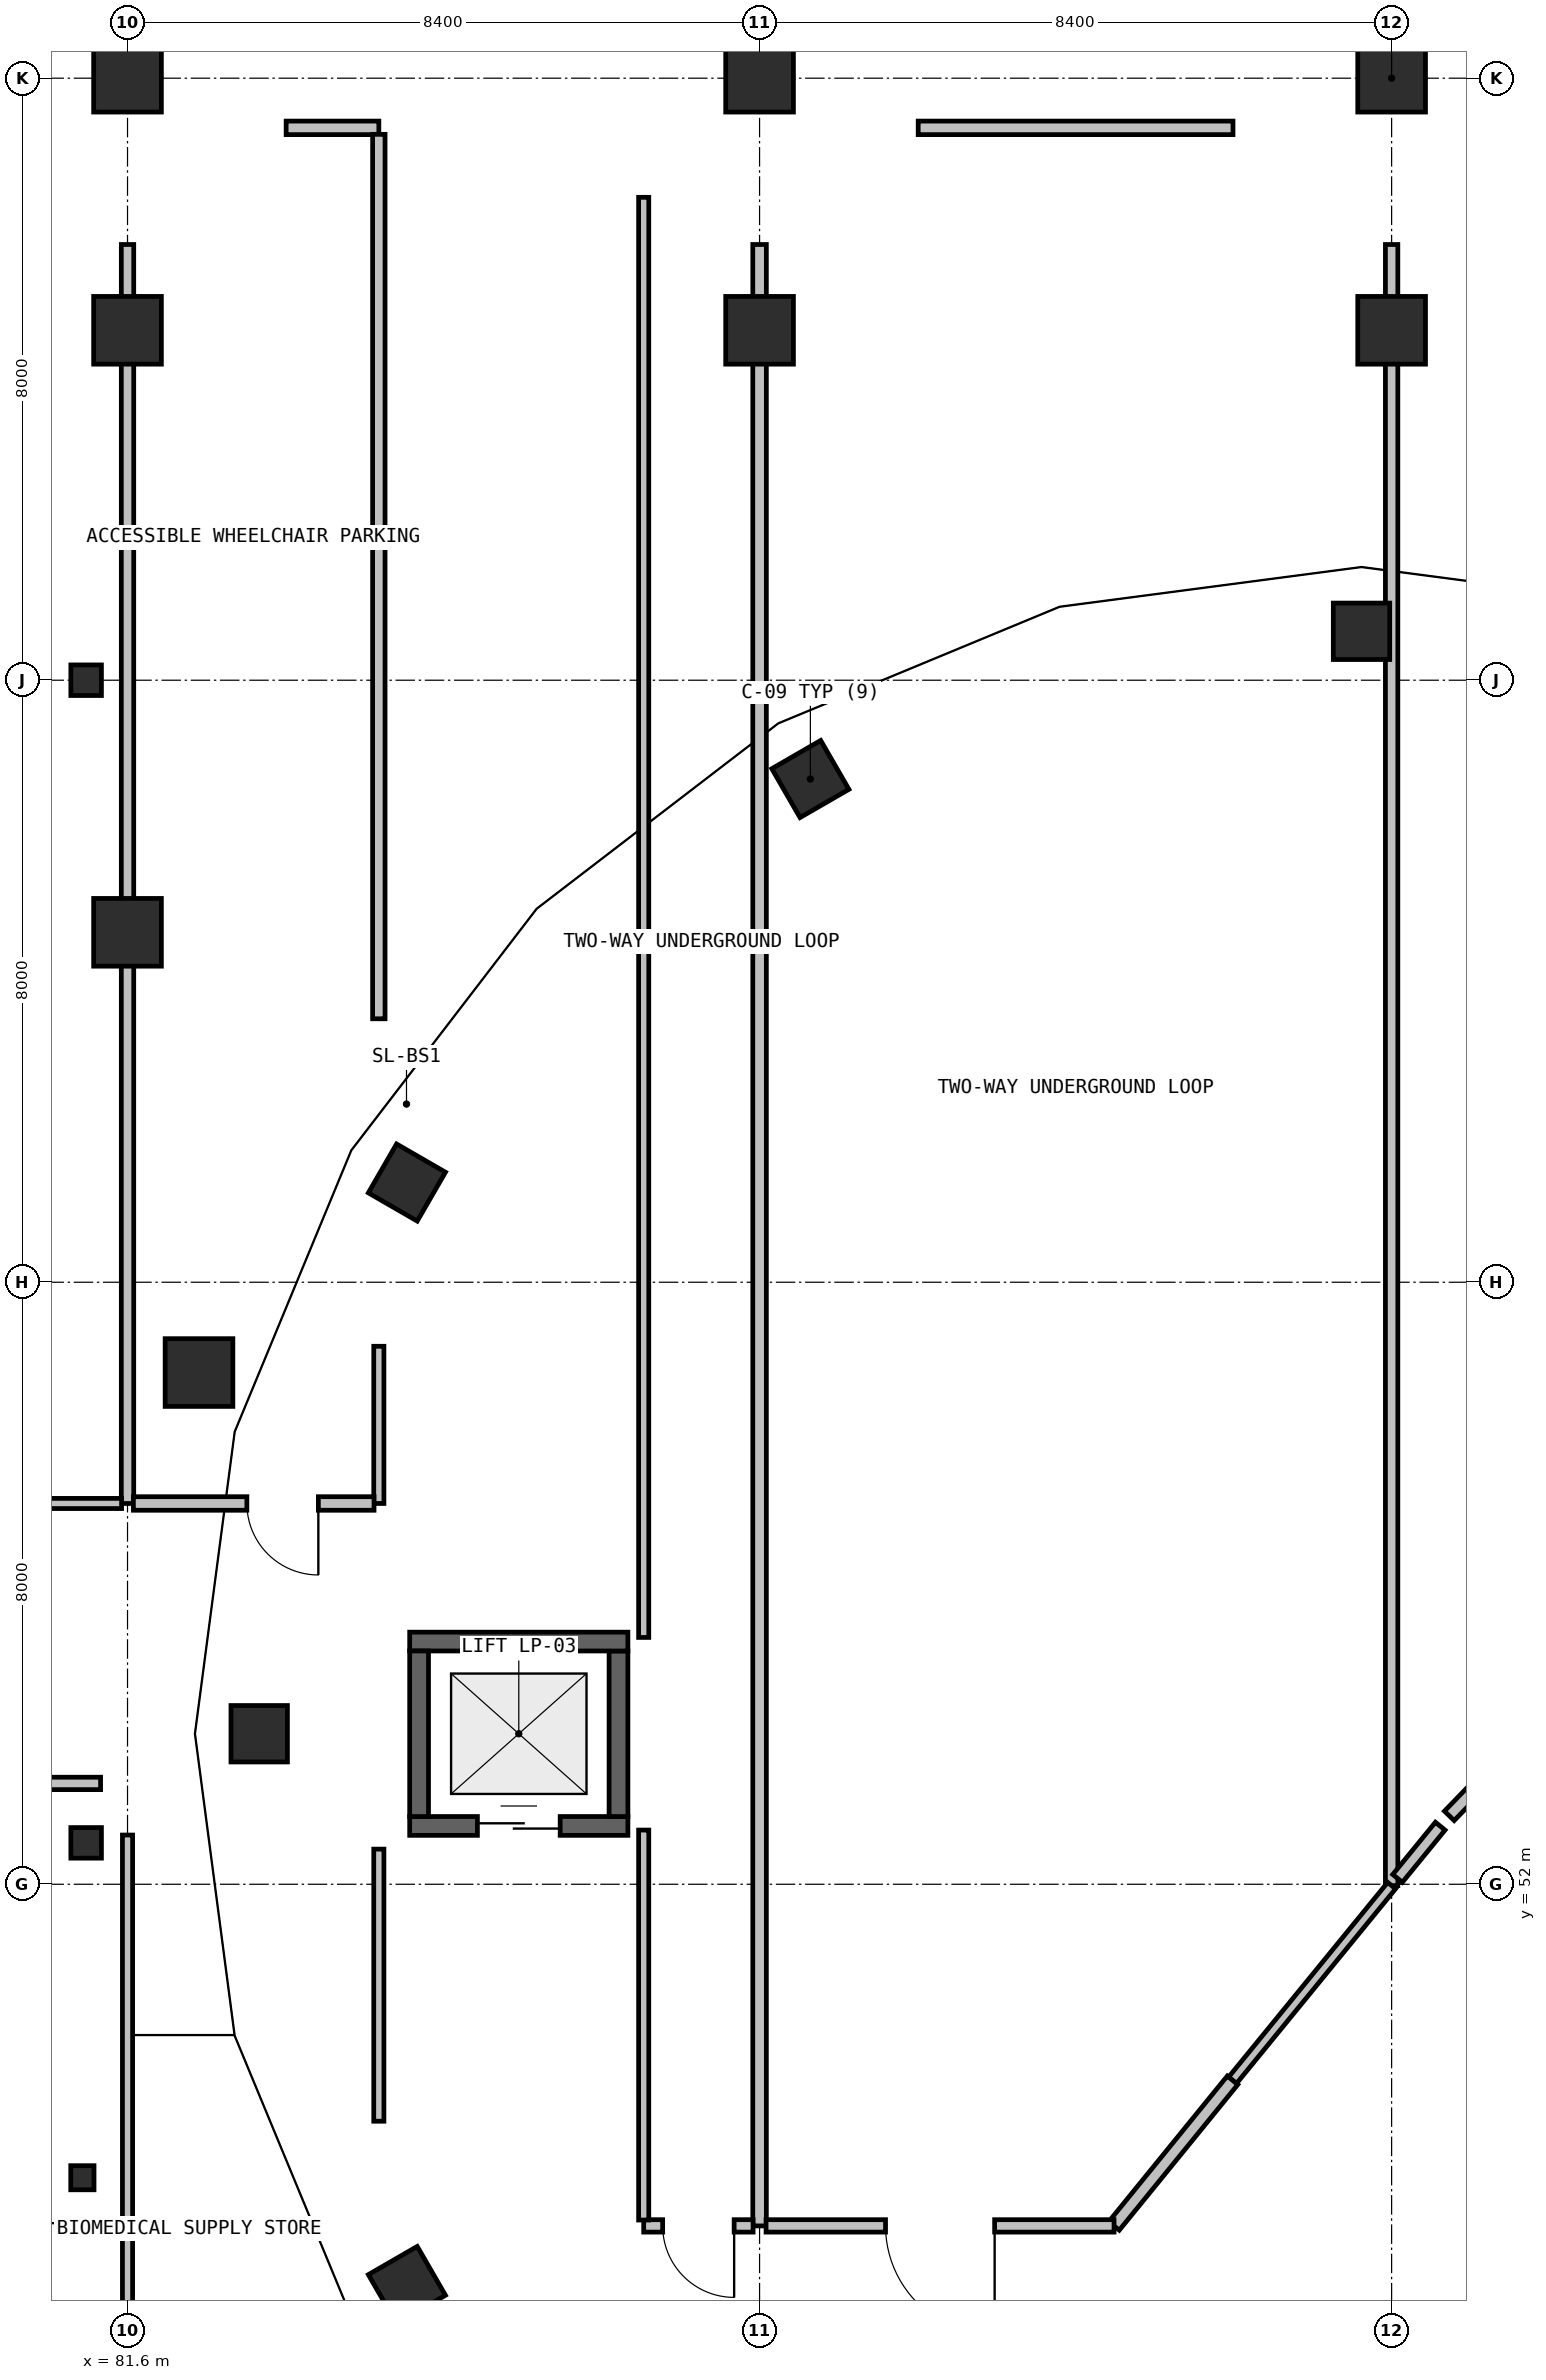
"""IFC4 building model, lengths in metres.
Left out: names, types, materials, properties, quantities, classifications, styles, units other than length and angle.
Written with IfcOpenShell. Run it as: python <this file> out.ifc"""

import sys

from ifc_helpers import new_model, si_unit, direction, frame, frame_2d, origin, origin_2d, place, context, subcontext, project, spatial, rectangle, circle, hollow_circle, i_section, extrude, element, fill, save


model = new_model("IFC4")
c1 = context("Model", 3, precision=1e-05, world=origin(), true_north=direction((0.0, 1.0)))
c2 = subcontext(c1, "Body", "Model", "MODEL_VIEW")
j1 = project(units=[si_unit("LENGTHUNIT", "METRE"), si_unit("PLANEANGLEUNIT", "RADIAN")], contexts=[c1])
p1 = place(None, origin())
s1 = spatial("IfcSite", under=j1, at=p1, CompositionType="ELEMENT")
p2 = place(p1, origin())
s2 = spatial("IfcBuilding", under=s1, at=p2, CompositionType="ELEMENT")
p3 = place(p2, frame((0.0, 0.0, -4.8)))
s3 = spatial("IfcBuildingStorey", under=s2, at=p3, CompositionType="ELEMENT", Elevation=-4.8)
for number, where, z_axis, x_axis in (
    (1, (81.05, 52.55, 0.0), (0.0, 0.0, 1.0), (1.0, 0.0, 0.0)),
    (2, (81.05, 68.0, 0.0), (0.0, 0.0, 1.0), (1.0, 0.0, 0.0)),
):
    element("IfcColumn", number, at=place(p3, frame(where, z_axis=z_axis, x_axis=x_axis)), inside=s3, PredefinedType="COLUMN", context=c2, shape_type="SweptSolid", body=[
        extrude(hollow_circle(Radius=0.203, WallThickness=0.016, at=origin_2d()), origin(), (0.0, 0.0, 1.0), 4.8),
    ])
for number, where, z_axis, x_axis in (
    (3, (98.0, 68.65, 0.0), (0.0, 0.0, 1.0), (0.0, 1.0, 0.0)),
    (4, (90.675, 66.687, 0.0), (0.0, 0.0, 1.0), (-0.5, 0.866, 0.0)),
    (5, (85.313, 61.325, 0.0), (0.0, 0.0, 1.0), (-0.866, 0.5, 0.0)),
    (6, (83.35, 54.0, 0.0), (0.0, 0.0, 1.0), (-1.0, 0.0, 0.0)),
    (7, (85.313, 46.675, 0.0), (0.0, 0.0, 1.0), (-0.866, -0.5, 0.0)),
):
    element("IfcColumn", number, at=place(p3, frame(where, z_axis=z_axis, x_axis=x_axis)), inside=s3, PredefinedType="COLUMN", context=c2, shape_type="SweptSolid", body=[
        extrude(circle(Radius=0.375, at=origin_2d()), origin(), (0.0, 0.0, 1.0), 4.8),
    ])
p4 = place(p3, frame((82.55, 58.8, 0.0), z_axis=(0.0, 0.0, 1.0), x_axis=(1.0, 0.0, 0.0)))
e8 = element("IfcColumn", 8, at=p4, inside=s3, PredefinedType="COLUMN", context=c2, shape_type="SweptSolid", body=[
    extrude(rectangle(XDim=0.9, YDim=0.9, at=origin_2d()), origin(), (0.0, 0.0, 1.0), 4.8),
])
p5 = place(p3, frame((81.0, 48.1, 0.0), z_axis=(0.0, 0.0, 1.0), x_axis=(1.0, 0.0, 0.0)))
e9 = element("IfcColumn", 9, at=p5, inside=s3, PredefinedType="COLUMN", context=c2, shape_type="SweptSolid", body=[
    extrude(i_section(OverallWidth=0.309, OverallDepth=0.321, WebThickness=0.014, FlangeThickness=0.022, at=origin_2d()), origin(), (0.0, 0.0, 1.0), 4.8),
])
for number, where, z_axis, x_axis in (
    (10, (81.6, 64.65, 0.0), (0.0, 0.0, 1.0), (1.0, 0.0, 0.0)),
    (11, (81.6, 72.65, 0.0), (0.0, 0.0, 1.0), (1.0, 0.0, 0.0)),
    (12, (81.6, 76.0, 0.0), (0.0, 0.0, 1.0), (1.0, 0.0, 0.0)),
    (13, (90.0, 72.65, 0.0), (0.0, 0.0, 1.0), (1.0, 0.0, 0.0)),
    (14, (90.0, 76.0, 0.0), (0.0, 0.0, 1.0), (1.0, 0.0, 0.0)),
    (15, (98.4, 72.65, 0.0), (0.0, 0.0, 1.0), (1.0, 0.0, 0.0)),
    (16, (98.4, 76.0, 0.0), (0.0, 0.0, 1.0), (1.0, 0.0, 0.0)),
):
    element("IfcColumn", number, at=place(p3, frame(where, z_axis=z_axis, x_axis=x_axis)), inside=s3, PredefinedType="COLUMN", context=c2, shape_type="SweptSolid", body=[
        extrude(rectangle(XDim=0.9, YDim=0.9, at=origin_2d()), origin(), (0.0, 0.0, 1.0), 4.45),
    ])
p6 = place(p3, frame((85.35, 52.775, 0.0), z_axis=(0.0, 0.0, 1.0), x_axis=(1.0, 0.0, 0.0)))
e17 = element("IfcWall", 17, at=p6, inside=s3, PredefinedType="SHEAR", context=c2, shape_type="SweptSolid", body=[
    extrude(rectangle(XDim=2.9, YDim=0.25, at=frame_2d((1.45, 0.0))), origin(), (0.0, 0.0, 1.0), 4.45),
])
p7 = place(p6, frame((0.9, 0.0, 0.0)))
e18 = element("IfcOpeningElement", 18, at=p7, cuts=e17, PredefinedType="OPENING", context=c2, shape_type="SweptSolid", body=[
    extrude(rectangle(XDim=1.1, YDim=2.15, at=frame_2d((0.55, 1.075))), frame((0.0, 0.135, 0.0), z_axis=(0.0, -1.0, 0.0), x_axis=(1.0, 0.0, 0.0)), (0.0, 0.0, 1.0), 0.27),
])
p8 = place(p3, frame((88.125, 52.9, 0.0), z_axis=(0.0, 0.0, 1.0), x_axis=(0.0, 1.0, 0.0)))
e19 = element("IfcWall", 19, at=p8, inside=s3, PredefinedType="SHEAR", context=c2, shape_type="SweptSolid", body=[
    extrude(rectangle(XDim=2.2, YDim=0.25, at=frame_2d((1.1, 0.0))), origin(), (0.0, 0.0, 1.0), 4.45),
])
p9 = place(p3, frame((88.25, 55.225, 0.0), z_axis=(0.0, 0.0, 1.0), x_axis=(-1.0, 0.0, 0.0)))
e20 = element("IfcWall", 20, at=p9, inside=s3, PredefinedType="SHEAR", context=c2, shape_type="SweptSolid", body=[
    extrude(rectangle(XDim=2.9, YDim=0.25, at=frame_2d((1.45, 0.0))), origin(), (0.0, 0.0, 1.0), 4.45),
])
p10 = place(p3, frame((85.475, 55.1, 0.0), z_axis=(0.0, 0.0, 1.0), x_axis=(0.0, -1.0, 0.0)))
e21 = element("IfcWall", 21, at=p10, inside=s3, PredefinedType="SHEAR", context=c2, shape_type="SweptSolid", body=[
    extrude(rectangle(XDim=2.2, YDim=0.25, at=frame_2d((1.1, 0.0))), origin(), (0.0, 0.0, 1.0), 4.45),
])
p11 = place(p3, frame((76.0, 53.34, 0.0), z_axis=(0.0, 0.0, 1.0), x_axis=(1.0, 0.0, 0.0)))
e22 = element("IfcWall", 22, at=p11, inside=s3, PredefinedType="PARTITIONING", context=c2, shape_type="SweptSolid", body=[
    extrude(rectangle(XDim=5.242, YDim=0.165, at=frame_2d((2.621, 0.0))), origin(), (0.0, 0.0, 1.0), 4.45),
])
p12 = place(p3, frame((81.6, 52.654, 0.0), z_axis=(0.0, 0.0, 1.0), x_axis=(0.0, -1.0, 0.0)))
e23 = element("IfcWall", 23, at=p12, inside=s3, PredefinedType="PARTITIONING", context=c2, shape_type="SweptSolid", body=[
    extrude(rectangle(XDim=16.428, YDim=0.135, at=frame_2d((8.214, 0.0))), origin(), (0.0, 0.0, 1.0), 4.45),
])
p13 = place(p3, frame((81.6, 73.79, 0.0), z_axis=(0.0, 0.0, 1.0), x_axis=(0.0, -1.0, 0.0)))
e24 = element("IfcWall", 24, at=p13, inside=s3, PredefinedType="PARTITIONING", context=c2, shape_type="SweptSolid", body=[
    extrude(rectangle(XDim=16.73, YDim=0.165, at=frame_2d((8.365, 0.0))), origin(), (0.0, 0.0, 1.0), 4.45),
])
p14 = place(p3, frame((81.521, 57.06, 0.0), z_axis=(0.0, 0.0, 1.0), x_axis=(-1.0, 0.0, 0.0)))
e25 = element("IfcWall", 25, at=p14, inside=s3, PredefinedType="PARTITIONING", context=c2, shape_type="SweptSolid", body=[
    extrude(rectangle(XDim=8.235, YDim=0.135, at=frame_2d((4.118, 0.0))), origin(), (0.0, 0.0, 1.0), 4.45),
])
p15 = place(p14, frame((3.567, 0.0, 0.0)))
e26 = element("IfcOpeningElement", 26, at=p15, cuts=e25, PredefinedType="OPENING", context=c2, shape_type="SweptSolid", body=[
    extrude(rectangle(XDim=1.1, YDim=2.15, at=frame_2d((0.55, 1.075))), frame((0.0, 0.077, 0.0), z_axis=(0.0, -1.0, 0.0), x_axis=(1.0, 0.0, 0.0)), (0.0, 0.0, 1.0), 0.155),
])
p16 = place(p3, frame((84.94, 52.467, 0.0), z_axis=(0.0, 0.0, 1.0), x_axis=(0.0, -1.0, 0.0)))
e27 = element("IfcWall", 27, at=p16, inside=s3, PredefinedType="PARTITIONING", context=c2, shape_type="SweptSolid", body=[
    extrude(rectangle(XDim=3.616, YDim=0.135, at=frame_2d((1.808, 0.0))), origin(), (0.0, 0.0, 1.0), 4.45),
])
p17 = place(p3, frame((88.46, 55.28, 0.0), z_axis=(0.0, 0.0, 1.0), x_axis=(0.0, 1.0, 0.0)))
e28 = element("IfcWall", 28, at=p17, inside=s3, PredefinedType="PARTITIONING", context=c2, shape_type="SweptSolid", body=[
    extrude(rectangle(XDim=19.137, YDim=0.135, at=frame_2d((9.568, 0.0))), origin(), (0.0, 0.0, 1.0), 4.45),
])
p18 = place(p3, frame((90.0, 73.79, 0.0), z_axis=(0.0, 0.0, 1.0), x_axis=(0.0, -1.0, 0.0)))
e29 = element("IfcWall", 29, at=p18, inside=s3, PredefinedType="PARTITIONING", context=c2, shape_type="SweptSolid", body=[
    extrude(rectangle(XDim=26.33, YDim=0.18, at=frame_2d((13.165, 0.0))), origin(), (0.0, 0.0, 1.0), 4.45),
])
p19 = place(p3, frame((89.914, 47.46, 0.0), z_axis=(0.0, 0.0, 1.0), x_axis=(-1.0, 0.0, 0.0)))
e30 = element("IfcWall", 30, at=p19, inside=s3, PredefinedType="PARTITIONING", context=c2, shape_type="SweptSolid", body=[
    extrude(rectangle(XDim=1.454, YDim=0.165, at=frame_2d((0.727, 0.0))), origin(), (0.0, 0.0, 1.0), 4.45),
])
p20 = place(p19, frame((0.252, 0.0, 0.0)))
e31 = element("IfcOpeningElement", 31, at=p20, cuts=e30, PredefinedType="OPENING", context=c2, shape_type="SweptSolid", body=[
    extrude(rectangle(XDim=0.95, YDim=2.1, at=frame_2d((0.475, 1.05))), frame((0.0, 0.093, 0.0), z_axis=(0.0, -1.0, 0.0), x_axis=(1.0, 0.0, 0.0)), (0.0, 0.0, 1.0), 0.185),
])
p21 = place(p3, frame((88.46, 47.538, 0.0), z_axis=(0.0, 0.0, 1.0), x_axis=(0.0, 1.0, 0.0)))
e32 = element("IfcWall", 32, at=p21, inside=s3, PredefinedType="PARTITIONING", context=c2, shape_type="SweptSolid", body=[
    extrude(rectangle(XDim=5.182, YDim=0.135, at=frame_2d((2.591, 0.0))), origin(), (0.0, 0.0, 1.0), 4.45),
])
p22 = place(p3, frame((83.708, 75.34, 0.0), z_axis=(0.0, 0.0, 1.0), x_axis=(1.0, 0.0, 0.0)))
e33 = element("IfcWall", 33, at=p22, inside=s3, PredefinedType="PARTITIONING", context=c2, shape_type="SweptSolid", body=[
    extrude(rectangle(XDim=1.232, YDim=0.18, at=frame_2d((0.616, 0.0))), origin(), (0.0, 0.0, 1.0), 4.45),
])
p23 = place(p3, frame((84.94, 75.254, 0.0), z_axis=(0.0, 0.0, 1.0), x_axis=(0.0, -1.0, 0.0)))
e34 = element("IfcWall", 34, at=p23, inside=s3, PredefinedType="PARTITIONING", context=c2, shape_type="SweptSolid", body=[
    extrude(rectangle(XDim=11.753, YDim=0.165, at=frame_2d((5.876, 0.0))), origin(), (0.0, 0.0, 1.0), 4.45),
])
p24 = place(p3, frame((84.94, 59.149, 0.0), z_axis=(0.0, 0.0, 1.0), x_axis=(0.0, -1.0, 0.0)))
e35 = element("IfcWall", 35, at=p24, inside=s3, PredefinedType="PARTITIONING", context=c2, shape_type="SweptSolid", body=[
    extrude(rectangle(XDim=2.089, YDim=0.135, at=frame_2d((1.044, 0.0))), origin(), (0.0, 0.0, 1.0), 4.45),
])
p25 = place(p3, frame((84.876, 57.06, 0.0), z_axis=(0.0, 0.0, 1.0), x_axis=(-1.0, 0.0, 0.0)))
e36 = element("IfcWall", 36, at=p25, inside=s3, PredefinedType="PARTITIONING", context=c2, shape_type="SweptSolid", body=[
    extrude(rectangle(XDim=3.198, YDim=0.18, at=frame_2d((1.599, 0.0))), origin(), (0.0, 0.0, 1.0), 4.45),
])
p26 = place(p25, frame((0.74, 0.0, 0.0)))
e37 = element("IfcOpeningElement", 37, at=p26, cuts=e36, PredefinedType="OPENING", context=c2, shape_type="SweptSolid", body=[
    extrude(rectangle(XDim=0.95, YDim=2.1, at=frame_2d((0.475, 1.05))), frame((0.0, 0.1, 0.0), z_axis=(0.0, -1.0, 0.0), x_axis=(1.0, 0.0, 0.0)), (0.0, 0.0, 1.0), 0.2),
])
p27 = place(p3, frame((92.108, 75.34, 0.0), z_axis=(0.0, 0.0, 1.0), x_axis=(1.0, 0.0, 0.0)))
e38 = element("IfcWall", 38, at=p27, inside=s3, PredefinedType="PARTITIONING", context=c2, shape_type="SweptSolid", body=[
    extrude(rectangle(XDim=4.184, YDim=0.18, at=frame_2d((2.092, 0.0))), origin(), (0.0, 0.0, 1.0), 4.45),
])
p28 = place(p3, frame((98.4, 73.79, 0.0), z_axis=(0.0, 0.0, 1.0), x_axis=(0.0, -1.0, 0.0)))
e39 = element("IfcWall", 39, at=p28, inside=s3, PredefinedType="PARTITIONING", context=c2, shape_type="SweptSolid", body=[
    extrude(rectangle(XDim=21.808, YDim=0.165, at=frame_2d((10.904, 0.0))), origin(), (0.0, 0.0, 1.0), 4.45),
])
p29 = place(p3, frame((98.4, 51.982, 0.0), z_axis=(0.0, 0.0, 1.0), x_axis=(-0.632780039334, -0.774331596811, 0.0)))
e40 = element("IfcWall", 40, at=p29, inside=s3, PredefinedType="PARTITIONING", context=c2, shape_type="SweptSolid", body=[
    extrude(rectangle(XDim=3.341, YDim=0.135, at=frame_2d((1.67, 0.0))), origin(), (0.0, 0.0, 1.0), 4.45),
])
p30 = place(p3, frame((96.286, 49.395, 0.0), z_axis=(0.0, 0.0, 1.0), x_axis=(-0.631248128611, -0.775580943632, 0.0)))
e41 = element("IfcWall", 41, at=p30, inside=s3, PredefinedType="PARTITIONING", context=c2, shape_type="SweptSolid", body=[
    extrude(rectangle(XDim=2.495, YDim=0.18, at=frame_2d((1.248, 0.0))), origin(), (0.0, 0.0, 1.0), 4.45),
])
p31 = place(p3, frame((94.711, 47.46, 0.0), z_axis=(0.0, 0.0, 1.0), x_axis=(-1.0, 0.0, 0.0)))
e42 = element("IfcWall", 42, at=p31, inside=s3, PredefinedType="PARTITIONING", context=c2, shape_type="SweptSolid", body=[
    extrude(rectangle(XDim=4.625, YDim=0.165, at=frame_2d((2.312, 0.0))), origin(), (0.0, 0.0, 1.0), 4.45),
])
p32 = place(p31, frame((1.587, 0.0, 0.0)))
e43 = element("IfcOpeningElement", 43, at=p32, cuts=e42, PredefinedType="OPENING", context=c2, shape_type="SweptSolid", body=[
    extrude(rectangle(XDim=1.45, YDim=2.15, at=frame_2d((0.725, 1.075))), frame((0.0, 0.093, 0.0), z_axis=(0.0, -1.0, 0.0), x_axis=(1.0, 0.0, 0.0)), (0.0, 0.0, 1.0), 0.185),
])
p33 = place(p3, frame((102.194, 56.043, 0.0), z_axis=(0.0, 0.0, 1.0), x_axis=(-0.694729493299, -0.719271111015, 0.0)))
e44 = element("IfcWall", 44, at=p33, inside=s3, PredefinedType="PARTITIONING", context=c2, shape_type="SweptSolid", body=[
    extrude(rectangle(XDim=4.357, YDim=0.18, at=frame_2d((2.179, 0.0))), origin(), (0.0, 0.0, 1.0), 4.45),
])
p34 = place(p3, frame((99.046, 52.772, 0.0), z_axis=(0.0, 0.0, 1.0), x_axis=(-0.632569979501, -0.774503209182, 0.0)))
e45 = element("IfcWall", 45, at=p34, inside=s3, PredefinedType="PARTITIONING", context=c2, shape_type="SweptSolid", body=[
    extrude(rectangle(XDim=0.896, YDim=0.165, at=frame_2d((0.448, 0.0))), origin(), (0.0, 0.0, 1.0), 4.45),
])
p35 = place(p7, origin())
e46 = element("IfcDoor", 46, at=p35, inside=s3, OperationType="DOUBLE_DOOR_SLIDING", PredefinedType="DOOR", context=c2, shape_type="SweptSolid", body=[
    extrude(rectangle(XDim=1.1, YDim=2.15, at=frame_2d((0.55, 1.075))), frame((0.0, 0.025, 0.0), z_axis=(0.0, -1.0, 0.0), x_axis=(1.0, 0.0, 0.0)), (0.0, 0.0, 1.0), 0.05),
])
fill(e18, e46)
p36 = place(p20, origin())
e47 = element("IfcDoor", 47, at=p36, inside=s3, OperationType="SINGLE_SWING_RIGHT", PredefinedType="DOOR", context=c2, shape_type="SweptSolid", body=[
    extrude(rectangle(XDim=0.95, YDim=2.1, at=frame_2d((0.475, 1.05))), frame((0.0, 0.025, 0.0), z_axis=(0.0, -1.0, 0.0), x_axis=(1.0, 0.0, 0.0)), (0.0, 0.0, 1.0), 0.05),
])
fill(e31, e47)
p37 = place(p26, origin())
e48 = element("IfcDoor", 48, at=p37, inside=s3, OperationType="SINGLE_SWING_LEFT", PredefinedType="DOOR", context=c2, shape_type="SweptSolid", body=[
    extrude(rectangle(XDim=0.95, YDim=2.1, at=frame_2d((0.475, 1.05))), frame((0.0, 0.025, 0.0), z_axis=(0.0, -1.0, 0.0), x_axis=(1.0, 0.0, 0.0)), (0.0, 0.0, 1.0), 0.05),
])
fill(e37, e48)
p38 = place(p32, origin())
e49 = element("IfcDoor", 49, at=p38, inside=s3, OperationType="SINGLE_SWING_LEFT", PredefinedType="DOOR", context=c2, shape_type="SweptSolid", body=[
    extrude(rectangle(XDim=1.45, YDim=2.15, at=frame_2d((0.725, 1.075))), frame((0.0, 0.025, 0.0), z_axis=(0.0, -1.0, 0.0), x_axis=(1.0, 0.0, 0.0)), (0.0, 0.0, 1.0), 0.05),
])
fill(e43, e49)
save(model, sys.argv[1])
